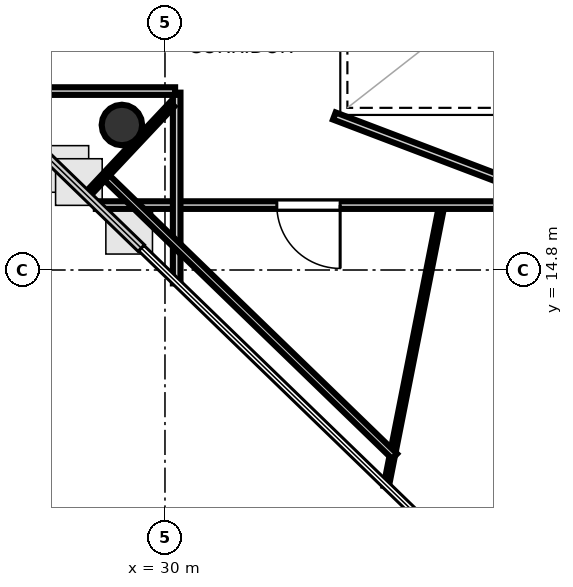
"""IFC4 building model, lengths in metres.
Left out: names, types, materials, properties, quantities, classifications, styles, units other than length and angle.
Written with IfcOpenShell. Run it as: python <this file> out.ifc"""

import sys

from ifc_helpers import new_model, si_unit, direction, frame, frame_2d, origin, origin_2d, place, context, subcontext, project, spatial, rectangle, hollow_circle, extrude, element, fill, save


model = new_model("IFC4")
c1 = context("Model", 3, precision=1e-05, world=origin(), true_north=direction((0.0, 1.0)))
c2 = subcontext(c1, "Body", "Model", "MODEL_VIEW")
j1 = project(units=[si_unit("LENGTHUNIT", "METRE"), si_unit("PLANEANGLEUNIT", "RADIAN")], contexts=[c1])
p1 = place(None, origin())
s1 = spatial("IfcSite", under=j1, at=p1, CompositionType="ELEMENT")
p2 = place(p1, origin())
s2 = spatial("IfcBuilding", under=s1, at=p2, CompositionType="ELEMENT")
p3 = place(p2, frame((0.0, 0.0, 344.4)))
s3 = spatial("IfcBuildingStorey", under=s2, at=p3, CompositionType="ELEMENT", Elevation=344.4)
p4 = place(p3, frame((29.15, 17.662, 0.0), z_axis=(0.0, 0.0, 1.0), x_axis=(1.0, 0.0, 0.0)))
e1 = element("IfcColumn", 1, at=p4, inside=s3, PredefinedType="COLUMN", context=c2, shape_type="SweptSolid", body=[
    extrude(hollow_circle(Radius=0.4, WallThickness=0.022, at=origin_2d()), origin(), (0.0, 0.0, 1.0), 3.7),
])
p5 = place(p3, frame((42.65, 16.081, 0.0), z_axis=(0.0, 0.0, 1.0), x_axis=(-1.0, 0.0, 0.0)))
e2 = element("IfcWall", 2, at=p5, inside=s3, PredefinedType="PARTITIONING", context=c2, shape_type="SweptSolid", body=[
    extrude(rectangle(XDim=14.014, YDim=0.15, at=frame_2d((7.007, 0.0))), origin(), (0.0, 0.0, 1.0), 2.84),
])
p6 = place(p5, frame((9.193, 0.0, 0.0)))
e3 = element("IfcOpeningElement", 3, at=p6, cuts=e2, PredefinedType="OPENING", context=c2, shape_type="SweptSolid", body=[
    extrude(rectangle(XDim=1.25, YDim=2.2, at=frame_2d((0.625, 1.1))), frame((0.0, 0.085, 0.0), z_axis=(0.0, -1.0, 0.0), x_axis=(1.0, 0.0, 0.0)), (0.0, 0.0, 1.0), 0.17),
])
p7 = place(p3, frame((30.231, 14.536, 0.0), z_axis=(0.0, 0.0, 1.0), x_axis=(0.0, 1.0, 0.0)))
e4 = element("IfcWall", 4, at=p7, inside=s3, PredefinedType="PARTITIONING", context=c2, shape_type="SweptSolid", body=[
    extrude(rectangle(XDim=3.764, YDim=0.15, at=frame_2d((1.882, 0.0))), origin(), (0.0, 0.0, 1.0), 2.84),
])
p8 = place(p3, frame((30.2, 18.331, 0.0), z_axis=(0.0, 0.0, 1.0), x_axis=(-1.0, 0.0, 0.0)))
e5 = element("IfcWall", 5, at=p8, inside=s3, PredefinedType="PARTITIONING", context=c2, shape_type="SweptSolid", body=[
    extrude(rectangle(XDim=3.888, YDim=0.15, at=frame_2d((1.944, 0.0))), origin(), (0.0, 0.0, 1.0), 2.84),
])
p9 = place(p3, frame((33.342, 17.839, 0.0), z_axis=(0.0, 0.0, 1.0), x_axis=(0.93476643205, -0.355262885076, 0.0)))
e6 = element("IfcWall", 6, at=p9, inside=s3, PredefinedType="PARTITIONING", context=c2, shape_type="SweptSolid", body=[
    extrude(rectangle(XDim=3.688, YDim=0.15, at=frame_2d((1.844, 0.0))), origin(), (0.0, 0.0, 1.0), 2.84),
])
p10 = place(p3, frame((35.443, 15.976, 0.0), z_axis=(0.0, 0.0, 1.0), x_axis=(-0.194002145434, -0.981001104774, 0.0)))
e7 = element("IfcWall", 7, at=p10, inside=s3, PredefinedType="PARTITIONING", context=c2, shape_type="SweptSolid", body=[
    extrude(rectangle(XDim=5.553, YDim=0.105, at=frame_2d((2.777, 0.0))), origin(), (0.0, 0.0, 1.0), 2.84),
])
p11 = place(p3, frame((34.532, 11.123, 0.0), z_axis=(0.0, 0.0, 1.0), x_axis=(-0.71837052358, 0.695660686579, 0.0)))
e8 = element("IfcWall", 8, at=p11, inside=s3, PredefinedType="PARTITIONING", context=c2, shape_type="SweptSolid", body=[
    extrude(rectangle(XDim=7.988, YDim=0.14, at=frame_2d((3.994, 0.0))), origin(), (0.0, 0.0, 1.0), 2.84),
])
p12 = place(p3, frame((28.442, 16.26, 0.0), z_axis=(0.0, 0.0, 1.0), x_axis=(0.684990400342, 0.728552092468, 0.0)))
e9 = element("IfcWall", 9, at=p12, inside=s3, PredefinedType="PARTITIONING", context=c2, shape_type="SweptSolid", body=[
    extrude(rectangle(XDim=2.483, YDim=0.12, at=frame_2d((1.241, 0.0))), origin(), (0.0, 0.0, 1.0), 2.84),
])
p13 = place(p6, origin())
e10 = element("IfcDoor", 10, at=p13, inside=s3, OperationType="SINGLE_SWING_LEFT", PredefinedType="DOOR", context=c2, shape_type="SweptSolid", body=[
    extrude(rectangle(XDim=1.25, YDim=2.2, at=frame_2d((0.625, 1.1))), frame((0.0, 0.025, 0.0), z_axis=(0.0, -1.0, 0.0), x_axis=(1.0, 0.0, 0.0)), (0.0, 0.0, 1.0), 0.05),
])
fill(e3, e10)
save(model, sys.argv[1])
